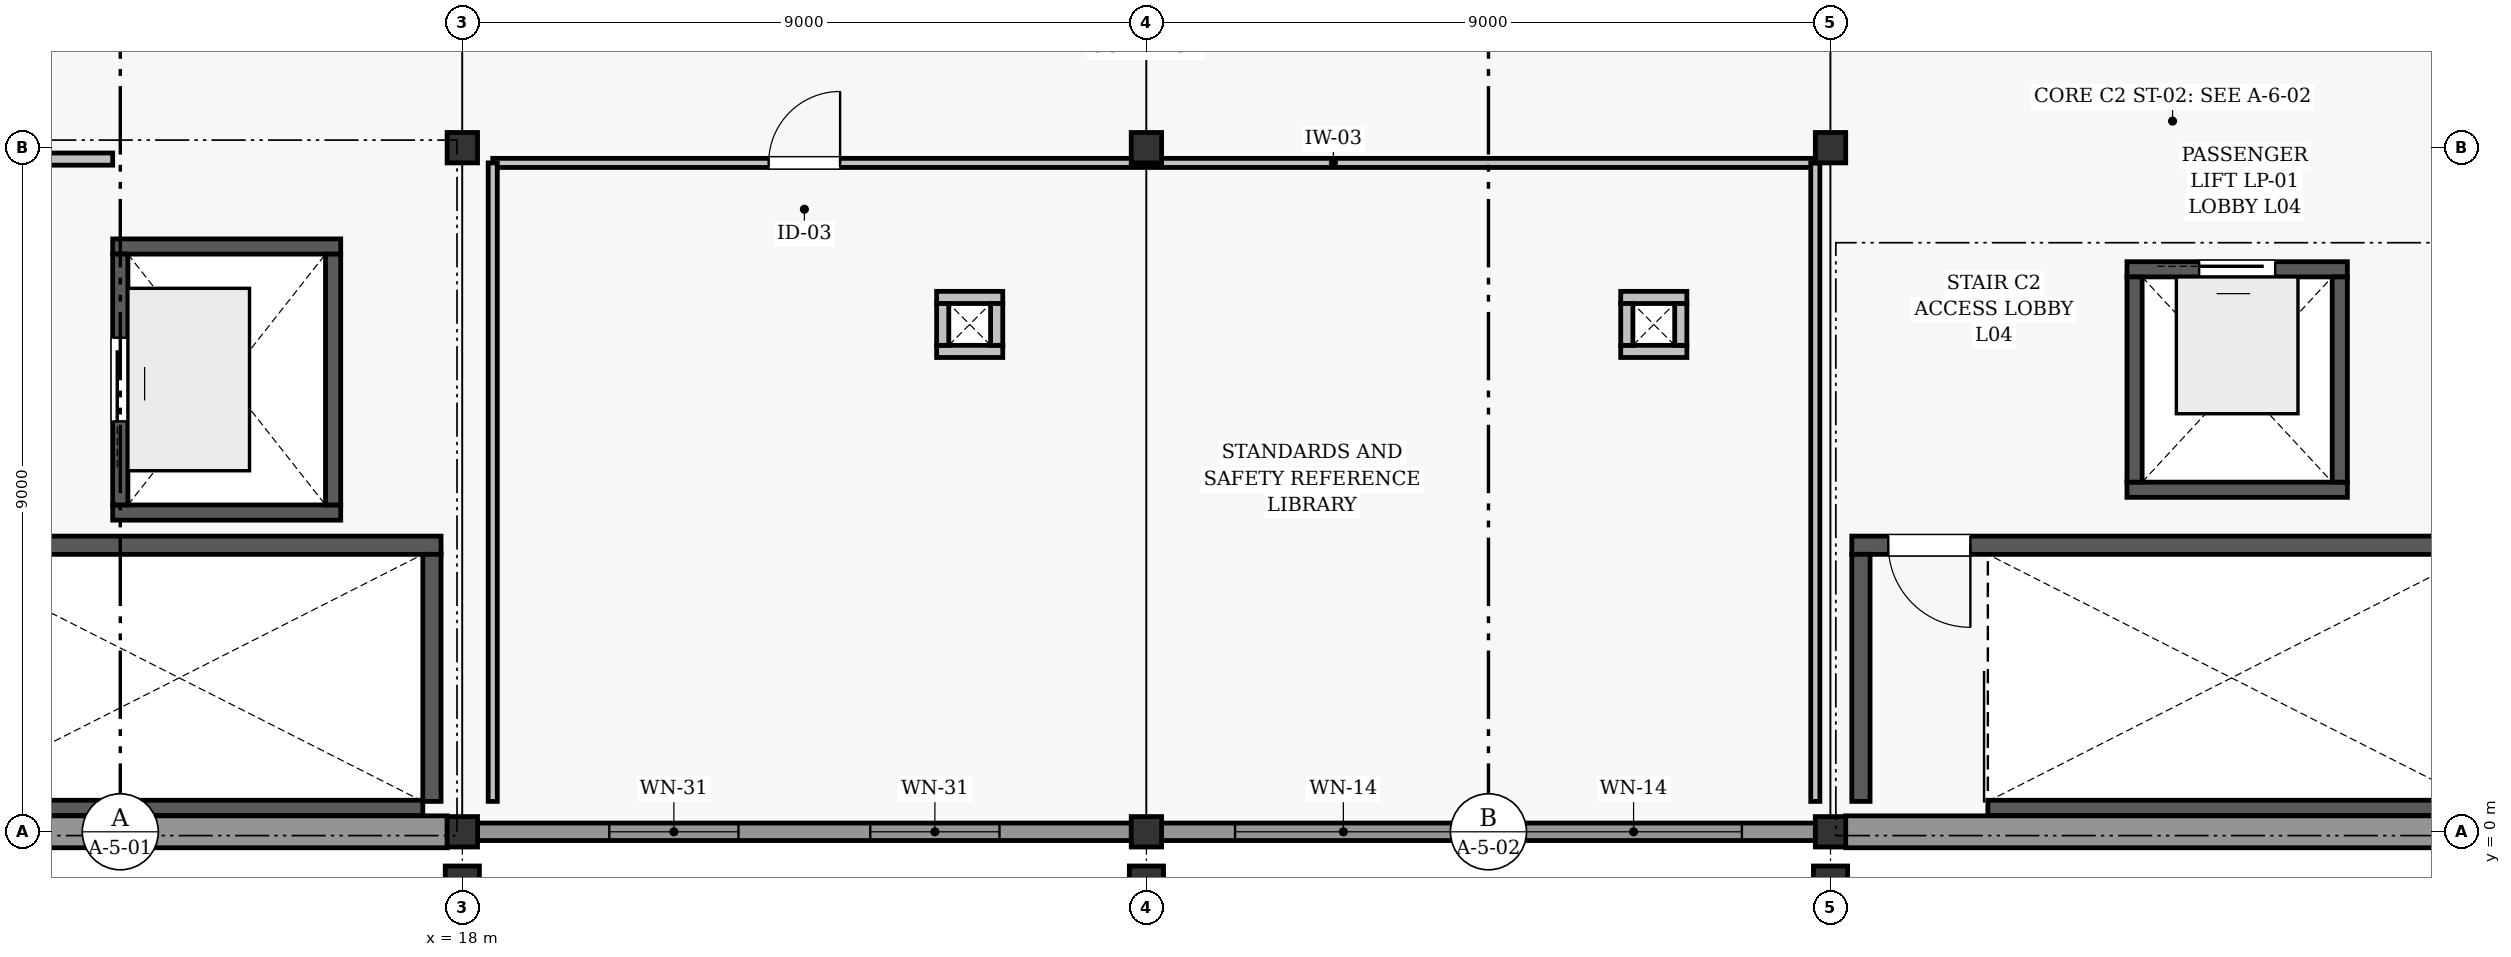
"""IFC4 building model, lengths in metres.
Left out: names, types, materials, properties, quantities, classifications, styles, units other than length and angle.
Written with IfcOpenShell. Run it as: python <this file> out.ifc"""

import sys

from ifc_helpers import new_model, si_unit, direction, frame, frame_2d, origin, origin_2d, place, context, subcontext, project, spatial, rectangle, extrude, element, fill, save


model = new_model("IFC4")
c1 = context("Model", 3, precision=1e-05, world=origin(), true_north=direction((0.0, 1.0)))
c2 = subcontext(c1, "Body", "Model", "MODEL_VIEW")
j1 = project(units=[si_unit("LENGTHUNIT", "METRE"), si_unit("PLANEANGLEUNIT", "RADIAN")], contexts=[c1])
p1 = place(None, origin())
s1 = spatial("IfcSite", under=j1, at=p1, CompositionType="ELEMENT")
p2 = place(p1, origin())
s2 = spatial("IfcBuilding", under=s1, at=p2, CompositionType="ELEMENT")
p3 = place(p2, frame((0.0, 0.0, 15.0)))
s3 = spatial("IfcBuildingStorey", under=s2, at=p3, CompositionType="ELEMENT", Elevation=15.0)
for number, where, z_axis, x_axis in (
    (1, (18.0, 0.0, 0.0), (0.0, 0.0, 1.0), (1.0, 0.0, 0.0)),
    (2, (18.0, 9.0, 0.0), (0.0, 0.0, 1.0), (1.0, 0.0, 0.0)),
    (3, (27.0, 0.0, 0.0), (0.0, 0.0, 1.0), (1.0, 0.0, 0.0)),
    (4, (27.0, 9.0, 0.0), (0.0, 0.0, 1.0), (1.0, 0.0, 0.0)),
    (5, (36.0, 0.0, 0.0), (0.0, 0.0, 1.0), (1.0, 0.0, 0.0)),
    (6, (36.0, 9.0, 0.0), (0.0, 0.0, 1.0), (1.0, 0.0, 0.0)),
):
    element("IfcColumn", number, at=place(p3, frame(where, z_axis=z_axis, x_axis=x_axis)), inside=s3, PredefinedType="COLUMN", context=c2, shape_type="SweptSolid", body=[
        extrude(rectangle(XDim=0.4, YDim=0.4, at=origin_2d()), origin(), (0.0, 0.0, 1.0), 3.0),
    ])
for number, where, z_axis, x_axis in (
    (7, (18.0, -0.75, 0.0), (0.0, 0.0, 1.0), (1.0, 0.0, 0.0)),
    (8, (27.0, -0.75, 0.0), (0.0, 0.0, 1.0), (1.0, 0.0, 0.0)),
    (9, (36.0, -0.75, 0.0), (0.0, 0.0, 1.0), (1.0, 0.0, 0.0)),
):
    element("IfcColumn", number, at=place(p3, frame(where, z_axis=z_axis, x_axis=x_axis)), inside=s3, PredefinedType="PILASTER", context=c2, shape_type="SweptSolid", body=[
        extrude(rectangle(XDim=0.45, YDim=0.6, at=origin_2d()), origin(), (0.0, 0.0, 1.0), 3.95),
    ])
p4 = place(p3, frame((9.198, 0.0, 0.0), z_axis=(0.0, 0.0, 1.0), x_axis=(1.0, 0.0, 0.0)))
e10 = element("IfcWall", 10, at=p4, inside=s3, PredefinedType="SOLIDWALL", context=c2, shape_type="SweptSolid", body=[
    extrude(rectangle(XDim=8.604, YDim=0.42, at=frame_2d((4.302, 0.0))), origin(), (0.0, 0.0, 1.0), 2.242),
])
p5 = place(p3, frame((18.198, 0.0, 0.0), z_axis=(0.0, 0.0, 1.0), x_axis=(1.0, 0.0, 0.0)))
e11 = element("IfcWall", 11, at=p5, inside=s3, PredefinedType="SOLIDWALL", context=c2, shape_type="SweptSolid", body=[
    extrude(rectangle(XDim=8.604, YDim=0.23, at=frame_2d((4.302, 0.0))), origin(), (0.0, 0.0, 1.0), 2.242),
])
p6 = place(p5, frame((1.735, 0.0, 1.06)))
e12 = element("IfcOpeningElement", 12, at=p6, cuts=e11, PredefinedType="OPENING", context=c2, shape_type="SweptSolid", body=[
    extrude(rectangle(XDim=1.7, YDim=1.0, at=frame_2d((0.85, 0.5))), frame((0.0, 0.125, 0.0), z_axis=(0.0, -1.0, 0.0), x_axis=(1.0, 0.0, 0.0)), (0.0, 0.0, 1.0), 0.25),
])
p7 = place(p5, frame((5.169, 0.0, 1.06)))
e13 = element("IfcOpeningElement", 13, at=p7, cuts=e11, PredefinedType="OPENING", context=c2, shape_type="SweptSolid", body=[
    extrude(rectangle(XDim=1.7, YDim=1.0, at=frame_2d((0.85, 0.5))), frame((0.0, 0.125, 0.0), z_axis=(0.0, -1.0, 0.0), x_axis=(1.0, 0.0, 0.0)), (0.0, 0.0, 1.0), 0.25),
])
p8 = place(p3, frame((27.198, 0.0, 0.0), z_axis=(0.0, 0.0, 1.0), x_axis=(1.0, 0.0, 0.0)))
e14 = element("IfcWall", 14, at=p8, inside=s3, PredefinedType="SOLIDWALL", context=c2, shape_type="SweptSolid", body=[
    extrude(rectangle(XDim=8.604, YDim=0.23, at=frame_2d((4.302, 0.0))), origin(), (0.0, 0.0, 1.0), 2.242),
])
p9 = place(p8, frame((0.968, 0.0, 1.1)))
e15 = element("IfcOpeningElement", 15, at=p9, cuts=e14, PredefinedType="OPENING", context=c2, shape_type="SweptSolid", body=[
    extrude(rectangle(XDim=2.85, YDim=0.96, at=frame_2d((1.425, 0.48))), frame((0.0, 0.125, 0.0), z_axis=(0.0, -1.0, 0.0), x_axis=(1.0, 0.0, 0.0)), (0.0, 0.0, 1.0), 0.25),
])
p10 = place(p8, frame((4.786, 0.0, 1.1)))
e16 = element("IfcOpeningElement", 16, at=p10, cuts=e14, PredefinedType="OPENING", context=c2, shape_type="SweptSolid", body=[
    extrude(rectangle(XDim=2.85, YDim=0.96, at=frame_2d((1.425, 0.48))), frame((0.0, 0.125, 0.0), z_axis=(0.0, -1.0, 0.0), x_axis=(1.0, 0.0, 0.0)), (0.0, 0.0, 1.0), 0.25),
])
p11 = place(p3, frame((36.198, 0.0, 0.0), z_axis=(0.0, 0.0, 1.0), x_axis=(1.0, 0.0, 0.0)))
e17 = element("IfcWall", 17, at=p11, inside=s3, PredefinedType="SOLIDWALL", context=c2, shape_type="SweptSolid", body=[
    extrude(rectangle(XDim=8.604, YDim=0.42, at=frame_2d((4.302, 0.0))), origin(), (0.0, 0.0, 1.0), 2.242),
])
p12 = place(p3, frame((11.07, 0.315, 0.0), z_axis=(0.0, 0.0, 1.0), x_axis=(1.0, 0.0, 0.0)))
e18 = element("IfcWall", 18, at=p12, inside=s3, PredefinedType="SHEAR", context=c2, shape_type="SweptSolid", body=[
    extrude(rectangle(XDim=6.41, YDim=0.2, at=frame_2d((3.205, 0.0))), origin(), (0.0, 0.0, 1.0), 2.79),
])
p13 = place(p3, frame((9.28, 3.77, 0.0), z_axis=(0.0, 0.0, 1.0), x_axis=(1.0, 0.0, 0.0)))
e19 = element("IfcWall", 19, at=p13, inside=s3, PredefinedType="SHEAR", context=c2, shape_type="SweptSolid", body=[
    extrude(rectangle(XDim=8.44, YDim=0.24, at=frame_2d((4.22, 0.0))), origin(), (0.0, 0.0, 1.0), 2.79),
])
p14 = place(p13, frame((0.48, 0.0, 0.0)))
e20 = element("IfcOpeningElement", 20, at=p14, cuts=e19, PredefinedType="OPENING", context=c2, shape_type="SweptSolid", body=[
    extrude(rectangle(XDim=1.08, YDim=2.08, at=frame_2d((0.54, 1.04))), frame((0.0, 0.13, 0.0), z_axis=(0.0, -1.0, 0.0), x_axis=(1.0, 0.0, 0.0)), (0.0, 0.0, 1.0), 0.26),
])
p15 = place(p3, frame((17.6, 0.4, 0.0), z_axis=(0.0, 0.0, 1.0), x_axis=(0.0, 1.0, 0.0)))
e21 = element("IfcWall", 21, at=p15, inside=s3, PredefinedType="SHEAR", context=c2, shape_type="SweptSolid", body=[
    extrude(rectangle(XDim=3.25, YDim=0.24, at=frame_2d((1.625, 0.0))), origin(), (0.0, 0.0, 1.0), 2.79),
])
p16 = place(p3, frame((38.07, 0.315, 0.0), z_axis=(0.0, 0.0, 1.0), x_axis=(1.0, 0.0, 0.0)))
e22 = element("IfcWall", 22, at=p16, inside=s3, PredefinedType="SHEAR", context=c2, shape_type="SweptSolid", body=[
    extrude(rectangle(XDim=6.41, YDim=0.2, at=frame_2d((3.205, 0.0))), origin(), (0.0, 0.0, 1.0), 2.79),
])
p17 = place(p3, frame((36.28, 3.77, 0.0), z_axis=(0.0, 0.0, 1.0), x_axis=(1.0, 0.0, 0.0)))
e23 = element("IfcWall", 23, at=p17, inside=s3, PredefinedType="SHEAR", context=c2, shape_type="SweptSolid", body=[
    extrude(rectangle(XDim=8.44, YDim=0.24, at=frame_2d((4.22, 0.0))), origin(), (0.0, 0.0, 1.0), 2.79),
])
p18 = place(p17, frame((0.48, 0.0, 0.0)))
e24 = element("IfcOpeningElement", 24, at=p18, cuts=e23, PredefinedType="OPENING", context=c2, shape_type="SweptSolid", body=[
    extrude(rectangle(XDim=1.08, YDim=2.08, at=frame_2d((0.54, 1.04))), frame((0.0, 0.13, 0.0), z_axis=(0.0, -1.0, 0.0), x_axis=(1.0, 0.0, 0.0)), (0.0, 0.0, 1.0), 0.26),
])
p19 = place(p3, frame((36.4, 0.4, 0.0), z_axis=(0.0, 0.0, 1.0), x_axis=(0.0, 1.0, 0.0)))
e25 = element("IfcWall", 25, at=p19, inside=s3, PredefinedType="SHEAR", context=c2, shape_type="SweptSolid", body=[
    extrude(rectangle(XDim=3.25, YDim=0.24, at=frame_2d((1.625, 0.0))), origin(), (0.0, 0.0, 1.0), 2.79),
])
for number, where, z_axis, x_axis in (
    (26, (13.4, 4.2, 0.0), (0.0, 0.0, 1.0), (1.0, 0.0, 0.0)),
    (27, (13.4, 7.7, 0.0), (0.0, 0.0, 1.0), (1.0, 0.0, 0.0)),
):
    element("IfcWall", number, at=place(p3, frame(where, z_axis=z_axis, x_axis=x_axis)), inside=s3, PredefinedType="SHEAR", context=c2, shape_type="SweptSolid", body=[
        extrude(rectangle(XDim=3.0, YDim=0.2, at=frame_2d((1.5, 0.0))), origin(), (0.0, 0.0, 1.0), 2.79),
    ])
p20 = place(p3, frame((13.5, 4.3, 0.0), z_axis=(0.0, 0.0, 1.0), x_axis=(0.0, 1.0, 0.0)))
e28 = element("IfcWall", 28, at=p20, inside=s3, PredefinedType="SHEAR", context=c2, shape_type="SweptSolid", body=[
    extrude(rectangle(XDim=3.3, YDim=0.2, at=frame_2d((1.65, 0.0))), origin(), (0.0, 0.0, 1.0), 2.79),
])
p21 = place(p20, frame((1.1, 0.0, 0.0)))
e29 = element("IfcOpeningElement", 29, at=p21, cuts=e28, PredefinedType="OPENING", context=c2, shape_type="SweptSolid", body=[
    extrude(rectangle(XDim=1.1, YDim=2.1, at=frame_2d((0.55, 1.05))), frame((0.0, 0.11, 0.0), z_axis=(0.0, -1.0, 0.0), x_axis=(1.0, 0.0, 0.0)), (0.0, 0.0, 1.0), 0.22),
])
p22 = place(p3, frame((16.3, 4.3, 0.0), z_axis=(0.0, 0.0, 1.0), x_axis=(0.0, 1.0, 0.0)))
e30 = element("IfcWall", 30, at=p22, inside=s3, PredefinedType="SHEAR", context=c2, shape_type="SweptSolid", body=[
    extrude(rectangle(XDim=3.3, YDim=0.2, at=frame_2d((1.65, 0.0))), origin(), (0.0, 0.0, 1.0), 2.79),
])
p23 = place(p3, frame((39.9, 4.5, 0.0), z_axis=(0.0, 0.0, 1.0), x_axis=(1.0, 0.0, 0.0)))
e31 = element("IfcWall", 31, at=p23, inside=s3, PredefinedType="SHEAR", context=c2, shape_type="SweptSolid", body=[
    extrude(rectangle(XDim=2.9, YDim=0.2, at=frame_2d((1.45, 0.0))), origin(), (0.0, 0.0, 1.0), 2.79),
])
p24 = place(p3, frame((39.9, 7.4, 0.0), z_axis=(0.0, 0.0, 1.0), x_axis=(1.0, 0.0, 0.0)))
e32 = element("IfcWall", 32, at=p24, inside=s3, PredefinedType="SHEAR", context=c2, shape_type="SweptSolid", body=[
    extrude(rectangle(XDim=2.9, YDim=0.2, at=frame_2d((1.45, 0.0))), origin(), (0.0, 0.0, 1.0), 2.79),
])
p25 = place(p24, frame((0.95, 0.0, 0.0)))
e33 = element("IfcOpeningElement", 33, at=p25, cuts=e32, PredefinedType="OPENING", context=c2, shape_type="SweptSolid", body=[
    extrude(rectangle(XDim=1.0, YDim=2.1, at=frame_2d((0.5, 1.05))), frame((0.0, 0.11, 0.0), z_axis=(0.0, -1.0, 0.0), x_axis=(1.0, 0.0, 0.0)), (0.0, 0.0, 1.0), 0.22),
])
for number, where, z_axis, x_axis in (
    (34, (40.0, 4.6, 0.0), (0.0, 0.0, 1.0), (0.0, 1.0, 0.0)),
    (35, (42.7, 4.6, 0.0), (0.0, 0.0, 1.0), (0.0, 1.0, 0.0)),
):
    element("IfcWall", number, at=place(p3, frame(where, z_axis=z_axis, x_axis=x_axis)), inside=s3, PredefinedType="SHEAR", context=c2, shape_type="SweptSolid", body=[
        extrude(rectangle(XDim=2.7, YDim=0.2, at=frame_2d((1.35, 0.0))), origin(), (0.0, 0.0, 1.0), 2.79),
    ])
for number, where, z_axis, x_axis in (
    (36, (24.24, 6.32, 0.0), (0.0, 0.0, 1.0), (1.0, 0.0, 0.0)),
    (37, (24.24, 7.03, 0.0), (0.0, 0.0, 1.0), (1.0, 0.0, 0.0)),
):
    element("IfcWall", number, at=place(p3, frame(where, z_axis=z_axis, x_axis=x_axis)), inside=s3, PredefinedType="PARTITIONING", context=c2, shape_type="SweptSolid", body=[
        extrude(rectangle(XDim=0.87, YDim=0.16, at=frame_2d((0.435, 0.0))), origin(), (0.0, 0.0, 1.0), 2.79),
    ])
for number, where, z_axis, x_axis in (
    (38, (24.32, 6.4, 0.0), (0.0, 0.0, 1.0), (0.0, 1.0, 0.0)),
    (39, (25.03, 6.4, 0.0), (0.0, 0.0, 1.0), (0.0, 1.0, 0.0)),
):
    element("IfcWall", number, at=place(p3, frame(where, z_axis=z_axis, x_axis=x_axis)), inside=s3, PredefinedType="PARTITIONING", context=c2, shape_type="SweptSolid", body=[
        extrude(rectangle(XDim=0.55, YDim=0.16, at=frame_2d((0.275, 0.0))), origin(), (0.0, 0.0, 1.0), 2.79),
    ])
for number, where, z_axis, x_axis in (
    (40, (33.24, 6.32, 0.0), (0.0, 0.0, 1.0), (1.0, 0.0, 0.0)),
    (41, (33.24, 7.03, 0.0), (0.0, 0.0, 1.0), (1.0, 0.0, 0.0)),
):
    element("IfcWall", number, at=place(p3, frame(where, z_axis=z_axis, x_axis=x_axis)), inside=s3, PredefinedType="PARTITIONING", context=c2, shape_type="SweptSolid", body=[
        extrude(rectangle(XDim=0.87, YDim=0.16, at=frame_2d((0.435, 0.0))), origin(), (0.0, 0.0, 1.0), 2.79),
    ])
for number, where, z_axis, x_axis in (
    (42, (33.32, 6.4, 0.0), (0.0, 0.0, 1.0), (0.0, 1.0, 0.0)),
    (43, (34.03, 6.4, 0.0), (0.0, 0.0, 1.0), (0.0, 1.0, 0.0)),
):
    element("IfcWall", number, at=place(p3, frame(where, z_axis=z_axis, x_axis=x_axis)), inside=s3, PredefinedType="PARTITIONING", context=c2, shape_type="SweptSolid", body=[
        extrude(rectangle(XDim=0.55, YDim=0.16, at=frame_2d((0.275, 0.0))), origin(), (0.0, 0.0, 1.0), 2.79),
    ])
p26 = place(p3, frame((9.52, 8.85, 0.0), z_axis=(0.0, 0.0, 1.0), x_axis=(1.0, 0.0, 0.0)))
e44 = element("IfcWall", 44, at=p26, inside=s3, PredefinedType="PARTITIONING", context=c2, shape_type="SweptSolid", body=[
    extrude(rectangle(XDim=3.88, YDim=0.16, at=frame_2d((1.94, 0.0))), origin(), (0.0, 0.0, 1.0), 2.79),
])
p27 = place(p26, frame((1.32, 0.0, 0.0)))
e45 = element("IfcOpeningElement", 45, at=p27, cuts=e44, PredefinedType="OPENING", context=c2, shape_type="SweptSolid", body=[
    extrude(rectangle(XDim=1.22, YDim=2.12, at=frame_2d((0.61, 1.06))), frame((0.0, 0.09, 0.0), z_axis=(0.0, -1.0, 0.0), x_axis=(1.0, 0.0, 0.0)), (0.0, 0.0, 1.0), 0.18),
])
p28 = place(p3, frame((18.4, 8.8, 0.0), z_axis=(0.0, 0.0, 1.0), x_axis=(1.0, 0.0, 0.0)))
e46 = element("IfcWall", 46, at=p28, inside=s3, PredefinedType="PARTITIONING", context=c2, shape_type="SweptSolid", body=[
    extrude(rectangle(XDim=17.4, YDim=0.12, at=frame_2d((8.7, 0.0))), origin(), (0.0, 0.0, 1.0), 2.245),
])
p29 = place(p28, frame((3.63, 0.0, 0.0)))
e47 = element("IfcOpeningElement", 47, at=p29, cuts=e46, PredefinedType="OPENING", context=c2, shape_type="SweptSolid", body=[
    extrude(rectangle(XDim=0.94, YDim=2.06, at=frame_2d((0.47, 1.03))), frame((0.0, 0.07, 0.0), z_axis=(0.0, -1.0, 0.0), x_axis=(1.0, 0.0, 0.0)), (0.0, 0.0, 1.0), 0.14),
])
p30 = place(p3, frame((18.4, 0.4, 0.0), z_axis=(0.0, 0.0, 1.0), x_axis=(0.0, 1.0, 0.0)))
e48 = element("IfcWall", 48, at=p30, inside=s3, PredefinedType="PARTITIONING", context=c2, shape_type="SweptSolid", body=[
    extrude(rectangle(XDim=8.4, YDim=0.12, at=frame_2d((4.2, 0.0))), origin(), (0.0, 0.0, 1.0), 2.79),
])
p31 = place(p3, frame((35.8, 0.4, 0.0), z_axis=(0.0, 0.0, 1.0), x_axis=(0.0, 1.0, 0.0)))
e49 = element("IfcWall", 49, at=p31, inside=s3, PredefinedType="PARTITIONING", context=c2, shape_type="SweptSolid", body=[
    extrude(rectangle(XDim=8.4, YDim=0.12, at=frame_2d((4.2, 0.0))), origin(), (0.0, 0.0, 1.0), 2.245),
])
p32 = place(p6, origin())
e50 = element("IfcWindow", 50, at=p32, inside=s3, PartitioningType="SINGLE_PANEL", PredefinedType="WINDOW", context=c2, shape_type="SweptSolid", body=[
    extrude(rectangle(XDim=1.7, YDim=1.0, at=frame_2d((0.85, 0.5))), frame((0.0, 0.03, 0.0), z_axis=(0.0, -1.0, 0.0), x_axis=(1.0, 0.0, 0.0)), (0.0, 0.0, 1.0), 0.06),
])
fill(e12, e50)
p33 = place(p7, origin())
e51 = element("IfcWindow", 51, at=p33, inside=s3, PartitioningType="SINGLE_PANEL", PredefinedType="WINDOW", context=c2, shape_type="SweptSolid", body=[
    extrude(rectangle(XDim=1.7, YDim=1.0, at=frame_2d((0.85, 0.5))), frame((0.0, 0.03, 0.0), z_axis=(0.0, -1.0, 0.0), x_axis=(1.0, 0.0, 0.0)), (0.0, 0.0, 1.0), 0.06),
])
fill(e13, e51)
p34 = place(p9, origin())
e52 = element("IfcWindow", 52, at=p34, inside=s3, PartitioningType="SINGLE_PANEL", PredefinedType="WINDOW", context=c2, shape_type="SweptSolid", body=[
    extrude(rectangle(XDim=2.85, YDim=0.96, at=frame_2d((1.425, 0.48))), frame((0.0, 0.03, 0.0), z_axis=(0.0, -1.0, 0.0), x_axis=(1.0, 0.0, 0.0)), (0.0, 0.0, 1.0), 0.06),
])
fill(e15, e52)
p35 = place(p10, origin())
e53 = element("IfcWindow", 53, at=p35, inside=s3, PartitioningType="SINGLE_PANEL", PredefinedType="WINDOW", context=c2, shape_type="SweptSolid", body=[
    extrude(rectangle(XDim=2.85, YDim=0.96, at=frame_2d((1.425, 0.48))), frame((0.0, 0.03, 0.0), z_axis=(0.0, -1.0, 0.0), x_axis=(1.0, 0.0, 0.0)), (0.0, 0.0, 1.0), 0.06),
])
fill(e16, e53)
p36 = place(p18, frame((1.08, 0.0, 0.0), z_axis=(0.0, 0.0, 1.0), x_axis=(-1.0, 0.0, 0.0)))
e54 = element("IfcDoor", 54, at=p36, inside=s3, OperationType="SINGLE_SWING_RIGHT", PredefinedType="DOOR", context=c2, shape_type="SweptSolid", body=[
    extrude(rectangle(XDim=1.08, YDim=2.08, at=frame_2d((0.54, 1.04))), frame((0.0, 0.025, 0.0), z_axis=(0.0, -1.0, 0.0), x_axis=(1.0, 0.0, 0.0)), (0.0, 0.0, 1.0), 0.05),
])
fill(e24, e54)
p37 = place(p21, origin())
e55 = element("IfcDoor", 55, at=p37, inside=s3, OperationType="SLIDING_TO_LEFT", PredefinedType="DOOR", context=c2, shape_type="SweptSolid", body=[
    extrude(rectangle(XDim=1.1, YDim=2.1, at=frame_2d((0.55, 1.05))), frame((0.0, 0.025, 0.0), z_axis=(0.0, -1.0, 0.0), x_axis=(1.0, 0.0, 0.0)), (0.0, 0.0, 1.0), 0.05),
])
fill(e29, e55)
p38 = place(p25, origin())
e56 = element("IfcDoor", 56, at=p38, inside=s3, OperationType="SLIDING_TO_LEFT", PredefinedType="DOOR", context=c2, shape_type="SweptSolid", body=[
    extrude(rectangle(XDim=1.0, YDim=2.1, at=frame_2d((0.5, 1.05))), frame((0.0, 0.025, 0.0), z_axis=(0.0, -1.0, 0.0), x_axis=(1.0, 0.0, 0.0)), (0.0, 0.0, 1.0), 0.05),
])
fill(e33, e56)
p39 = place(p29, origin())
e57 = element("IfcDoor", 57, at=p39, inside=s3, OperationType="SINGLE_SWING_RIGHT", PredefinedType="DOOR", context=c2, shape_type="SweptSolid", body=[
    extrude(rectangle(XDim=0.94, YDim=2.06, at=frame_2d((0.47, 1.03))), frame((0.0, 0.025, 0.0), z_axis=(0.0, -1.0, 0.0), x_axis=(1.0, 0.0, 0.0)), (0.0, 0.0, 1.0), 0.05),
])
fill(e47, e57)
save(model, sys.argv[1])
